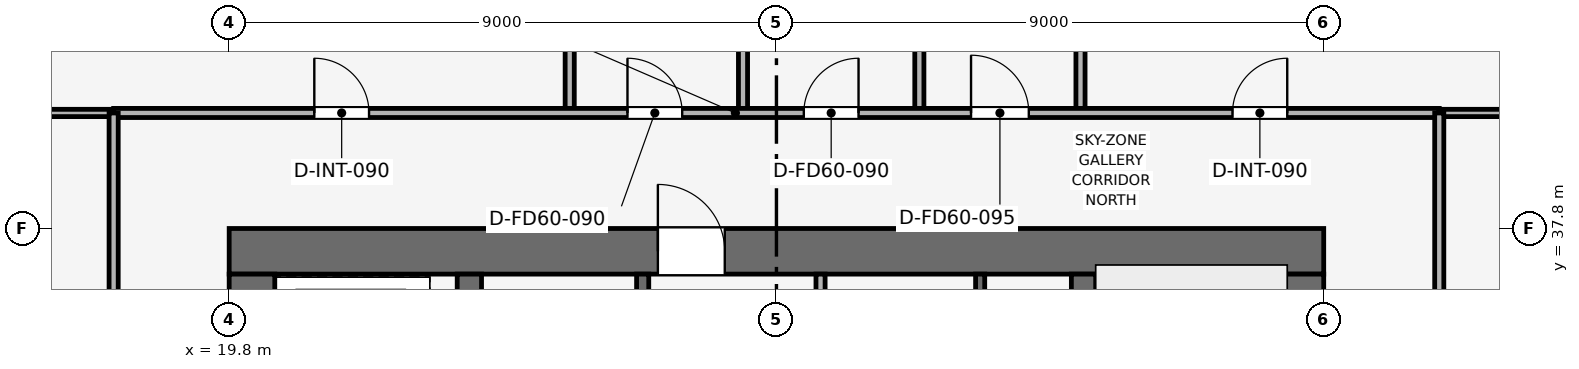
"""IFC4 building model, lengths in metres.
Left out: names, types, materials, properties, quantities, classifications, styles, units other than length and angle.
Written with IfcOpenShell. Run it as: python <this file> out.ifc"""

import sys

from ifc_helpers import new_model, si_unit, direction, frame, frame_2d, origin, place, context, subcontext, project, spatial, rectangle, extrude, element, fill, save


model = new_model("IFC4")
c1 = context("Model", 3, precision=1e-05, world=origin(), true_north=direction((0.0, 1.0)))
c2 = subcontext(c1, "Body", "Model", "MODEL_VIEW")
j1 = project(units=[si_unit("LENGTHUNIT", "METRE"), si_unit("PLANEANGLEUNIT", "RADIAN")], contexts=[c1])
p1 = place(None, origin())
s1 = spatial("IfcSite", under=j1, at=p1, CompositionType="ELEMENT")
p2 = place(p1, origin())
s2 = spatial("IfcBuilding", under=s1, at=p2, CompositionType="ELEMENT")
p3 = place(p2, frame((0.0, 0.0, 272.85)))
s3 = spatial("IfcBuildingStorey", under=s2, at=p3, CompositionType="ELEMENT", Elevation=272.85)
p4 = place(p3, frame((19.8, 37.425, 0.0), z_axis=(0.0, 0.0, 1.0), x_axis=(1.0, 0.0, 0.0)))
e1 = element("IfcWall", 1, at=p4, inside=s3, PredefinedType="SHEAR", context=c2, shape_type="SweptSolid", body=[
    extrude(rectangle(XDim=18.0, YDim=0.75, at=frame_2d((9.0, 0.0))), origin(), (0.0, 0.0, 1.0), 3.75),
])
p5 = place(p4, frame((7.05, 0.0, 0.0)))
e2 = element("IfcOpeningElement", 2, at=p5, cuts=e1, PredefinedType="OPENING", context=c2, shape_type="SweptSolid", body=[
    extrude(rectangle(XDim=1.1, YDim=2.15, at=frame_2d((0.55, 1.075))), frame((0.0, 0.385, 0.0), z_axis=(0.0, -1.0, 0.0), x_axis=(1.0, 0.0, 0.0)), (0.0, 0.0, 1.0), 0.77),
])
p6 = place(p3, frame((20.175, 20.55, 0.0), z_axis=(0.0, 0.0, 1.0), x_axis=(0.0, 1.0, 0.0)))
e3 = element("IfcWall", 3, at=p6, inside=s3, PredefinedType="SHEAR", context=c2, shape_type="SweptSolid", body=[
    extrude(rectangle(XDim=16.5, YDim=0.75, at=frame_2d((8.25, 0.0))), origin(), (0.0, 0.0, 1.0), 3.75),
])
p7 = place(p6, frame((10.25, 0.0, 0.0)))
e4 = element("IfcOpeningElement", 4, at=p7, cuts=e3, PredefinedType="OPENING", context=c2, shape_type="SweptSolid", body=[
    extrude(rectangle(XDim=1.1, YDim=2.15, at=frame_2d((0.55, 1.075))), frame((0.0, 0.385, 0.0), z_axis=(0.0, -1.0, 0.0), x_axis=(1.0, 0.0, 0.0)), (0.0, 0.0, 1.0), 0.77),
])
p8 = place(p3, frame((37.425, 20.55, 0.0), z_axis=(0.0, 0.0, 1.0), x_axis=(0.0, 1.0, 0.0)))
e5 = element("IfcWall", 5, at=p8, inside=s3, PredefinedType="SHEAR", context=c2, shape_type="SweptSolid", body=[
    extrude(rectangle(XDim=16.5, YDim=0.75, at=frame_2d((8.25, 0.0))), origin(), (0.0, 0.0, 1.0), 3.75),
])
p9 = place(p8, frame((4.75, 0.0, 0.0)))
e6 = element("IfcOpeningElement", 6, at=p9, cuts=e5, PredefinedType="OPENING", context=c2, shape_type="SweptSolid", body=[
    extrude(rectangle(XDim=1.1, YDim=2.15, at=frame_2d((0.55, 1.075))), frame((0.0, 0.385, 0.0), z_axis=(0.0, -1.0, 0.0), x_axis=(1.0, 0.0, 0.0)), (0.0, 0.0, 1.0), 0.77),
])
for number, where, z_axis, x_axis in (
    (7, (23.75, 20.55, 0.0), (0.0, 0.0, 1.0), (0.0, 1.0, 0.0)),
    (8, (33.85, 20.55, 0.0), (0.0, 0.0, 1.0), (0.0, 1.0, 0.0)),
):
    element("IfcWall", number, at=place(p3, frame(where, z_axis=z_axis, x_axis=x_axis)), inside=s3, PredefinedType="SHEAR", context=c2, shape_type="SweptSolid", body=[
        extrude(rectangle(XDim=16.5, YDim=0.4, at=frame_2d((8.25, 0.0))), origin(), (0.0, 0.0, 1.0), 3.75),
    ])
p10 = place(p3, frame((32.15, 34.0, 0.0), z_axis=(0.0, 0.0, 1.0), x_axis=(0.0, 1.0, 0.0)))
e9 = element("IfcWall", 9, at=p10, inside=s3, PredefinedType="SHEAR", context=c2, shape_type="SweptSolid", body=[
    extrude(rectangle(XDim=3.05, YDim=0.15, at=frame_2d((1.525, 0.0))), origin(), (0.0, 0.0, 1.0), 3.5),
])
p11 = place(p3, frame((26.6, 34.0, 0.0), z_axis=(0.0, 0.0, 1.0), x_axis=(0.0, 1.0, 0.0)))
e10 = element("IfcWall", 10, at=p11, inside=s3, PredefinedType="SHEAR", context=c2, shape_type="SweptSolid", body=[
    extrude(rectangle(XDim=3.05, YDim=0.2, at=frame_2d((1.525, 0.0))), origin(), (0.0, 0.0, 1.0), 3.5),
])
p12 = place(p11, frame((0.75, 0.0, 0.0)))
e11 = element("IfcOpeningElement", 11, at=p12, cuts=e10, PredefinedType="OPENING", context=c2, shape_type="SweptSolid", body=[
    extrude(rectangle(XDim=1.1, YDim=2.15, at=frame_2d((0.55, 1.075))), frame((0.0, 0.11, 0.0), z_axis=(0.0, -1.0, 0.0), x_axis=(1.0, 0.0, 0.0)), (0.0, 0.0, 1.0), 0.22),
])
p13 = place(p3, frame((29.525, 33.925, 0.0), z_axis=(0.0, 0.0, 1.0), x_axis=(0.0, 1.0, 0.0)))
e12 = element("IfcWall", 12, at=p13, inside=s3, PredefinedType="PARTITIONING", context=c2, shape_type="SweptSolid", body=[
    extrude(rectangle(XDim=3.125, YDim=0.15, at=frame_2d((1.562, 0.0))), origin(), (0.0, 0.0, 1.0), 3.5),
])
p14 = place(p13, frame((0.85, 0.0, 0.0)))
e13 = element("IfcOpeningElement", 13, at=p14, cuts=e12, PredefinedType="OPENING", context=c2, shape_type="SweptSolid", body=[
    extrude(rectangle(XDim=0.9, YDim=2.1, at=frame_2d((0.45, 1.05))), frame((0.0, 0.085, 0.0), z_axis=(0.0, -1.0, 0.0), x_axis=(1.0, 0.0, 0.0)), (0.0, 0.0, 1.0), 0.17),
])
p15 = place(p3, frame((25.4, 39.7, 0.0), z_axis=(0.0, 0.0, 1.0), x_axis=(0.0, 1.0, 0.0)))
e14 = element("IfcWall", 14, at=p15, inside=s3, PredefinedType="PARTITIONING", context=c2, shape_type="SweptSolid", body=[
    extrude(rectangle(XDim=13.87, YDim=0.15, at=frame_2d((6.935, 0.0))), origin(), (0.0, 0.0, 1.0), 3.085),
])
p16 = place(p15, frame((8.035, 0.0, 0.0)))
e15 = element("IfcOpeningElement", 15, at=p16, cuts=e14, PredefinedType="OPENING", context=c2, shape_type="SweptSolid", body=[
    extrude(rectangle(XDim=0.9, YDim=2.1, at=frame_2d((0.45, 1.05))), frame((0.0, 0.085, 0.0), z_axis=(0.0, -1.0, 0.0), x_axis=(1.0, 0.0, 0.0)), (0.0, 0.0, 1.0), 0.17),
])
p17 = place(p3, frame((33.8, 39.7, 0.0), z_axis=(0.0, 0.0, 1.0), x_axis=(0.0, 1.0, 0.0)))
e16 = element("IfcWall", 16, at=p17, inside=s3, PredefinedType="PARTITIONING", context=c2, shape_type="SweptSolid", body=[
    extrude(rectangle(XDim=13.87, YDim=0.15, at=frame_2d((6.935, 0.0))), origin(), (0.0, 0.0, 1.0), 3.085),
])
for number, where, z_axis, x_axis in (
    (17, (28.25, 39.7, 0.0), (0.0, 0.0, 1.0), (0.0, 1.0, 0.0)),
    (18, (31.15, 39.7, 0.0), (0.0, 0.0, 1.0), (0.0, 1.0, 0.0)),
):
    element("IfcWall", number, at=place(p3, frame(where, z_axis=z_axis, x_axis=x_axis)), inside=s3, PredefinedType="PARTITIONING", context=c2, shape_type="SweptSolid", body=[
        extrude(rectangle(XDim=3.1, YDim=0.15, at=frame_2d((1.55, 0.0))), origin(), (0.0, 0.0, 1.0), 3.5),
    ])
p18 = place(p3, frame((4.03, 39.7, 0.0), z_axis=(0.0, 0.0, 1.0), x_axis=(1.0, 0.0, 0.0)))
e19 = element("IfcWall", 19, at=p18, inside=s3, PredefinedType="PARTITIONING", context=c2, shape_type="SweptSolid", body=[
    extrude(rectangle(XDim=13.87, YDim=0.12, at=frame_2d((6.935, 0.0))), origin(), (0.0, 0.0, 1.0), 3.085),
])
p19 = place(p3, frame((39.7, 39.7, 0.0), z_axis=(0.0, 0.0, 1.0), x_axis=(1.0, 0.0, 0.0)))
e20 = element("IfcWall", 20, at=p19, inside=s3, PredefinedType="PARTITIONING", context=c2, shape_type="SweptSolid", body=[
    extrude(rectangle(XDim=13.87, YDim=0.12, at=frame_2d((6.935, 0.0))), origin(), (0.0, 0.0, 1.0), 3.085),
])
p20 = place(p3, frame((17.9, 39.7, 0.0), z_axis=(0.0, 0.0, 1.0), x_axis=(1.0, 0.0, 0.0)))
e21 = element("IfcWall", 21, at=p20, inside=s3, PredefinedType="PARTITIONING", context=c2, shape_type="SweptSolid", body=[
    extrude(rectangle(XDim=21.8, YDim=0.15, at=frame_2d((10.9, 0.0))), origin(), (0.0, 0.0, 1.0), 3.085),
])
p21 = place(p20, frame((3.3, 0.0, 0.0)))
e22 = element("IfcOpeningElement", 22, at=p21, cuts=e21, PredefinedType="OPENING", context=c2, shape_type="SweptSolid", body=[
    extrude(rectangle(XDim=0.9, YDim=2.1, at=frame_2d((0.45, 1.05))), frame((0.0, 0.085, 0.0), z_axis=(0.0, -1.0, 0.0), x_axis=(1.0, 0.0, 0.0)), (0.0, 0.0, 1.0), 0.17),
])
p22 = place(p20, frame((8.45, 0.0, 0.0)))
e23 = element("IfcOpeningElement", 23, at=p22, cuts=e21, PredefinedType="OPENING", context=c2, shape_type="SweptSolid", body=[
    extrude(rectangle(XDim=0.9, YDim=2.1, at=frame_2d((0.45, 1.05))), frame((0.0, 0.085, 0.0), z_axis=(0.0, -1.0, 0.0), x_axis=(1.0, 0.0, 0.0)), (0.0, 0.0, 1.0), 0.17),
])
p23 = place(p20, frame((11.35, 0.0, 0.0)))
e24 = element("IfcOpeningElement", 24, at=p23, cuts=e21, PredefinedType="OPENING", context=c2, shape_type="SweptSolid", body=[
    extrude(rectangle(XDim=0.9, YDim=2.1, at=frame_2d((0.45, 1.05))), frame((0.0, 0.085, 0.0), z_axis=(0.0, -1.0, 0.0), x_axis=(1.0, 0.0, 0.0)), (0.0, 0.0, 1.0), 0.17),
])
p24 = place(p20, frame((14.1, 0.0, 0.0)))
e25 = element("IfcOpeningElement", 25, at=p24, cuts=e21, PredefinedType="OPENING", context=c2, shape_type="SweptSolid", body=[
    extrude(rectangle(XDim=0.95, YDim=2.1, at=frame_2d((0.475, 1.05))), frame((0.0, 0.085, 0.0), z_axis=(0.0, -1.0, 0.0), x_axis=(1.0, 0.0, 0.0)), (0.0, 0.0, 1.0), 0.17),
])
p25 = place(p20, frame((18.4, 0.0, 0.0)))
e26 = element("IfcOpeningElement", 26, at=p25, cuts=e21, PredefinedType="OPENING", context=c2, shape_type="SweptSolid", body=[
    extrude(rectangle(XDim=0.9, YDim=2.1, at=frame_2d((0.45, 1.05))), frame((0.0, 0.085, 0.0), z_axis=(0.0, -1.0, 0.0), x_axis=(1.0, 0.0, 0.0)), (0.0, 0.0, 1.0), 0.17),
])
p26 = place(p3, frame((17.9, 10.8, 0.0), z_axis=(0.0, 0.0, 1.0), x_axis=(0.0, 1.0, 0.0)))
e27 = element("IfcWall", 27, at=p26, inside=s3, PredefinedType="PARTITIONING", context=c2, shape_type="SweptSolid", body=[
    extrude(rectangle(XDim=28.9, YDim=0.15, at=frame_2d((14.45, 0.0))), origin(), (0.0, 0.0, 1.0), 3.085),
])
p27 = place(p26, frame((0.7, 0.0, 0.0)))
e28 = element("IfcOpeningElement", 28, at=p27, cuts=e27, PredefinedType="OPENING", context=c2, shape_type="SweptSolid", body=[
    extrude(rectangle(XDim=0.9, YDim=2.1, at=frame_2d((0.45, 1.05))), frame((0.0, 0.085, 0.0), z_axis=(0.0, -1.0, 0.0), x_axis=(1.0, 0.0, 0.0)), (0.0, 0.0, 1.0), 0.17),
])
p28 = place(p26, frame((5.952, 0.0, 0.0)))
e29 = element("IfcOpeningElement", 29, at=p28, cuts=e27, PredefinedType="OPENING", context=c2, shape_type="SweptSolid", body=[
    extrude(rectangle(XDim=0.9, YDim=2.1, at=frame_2d((0.45, 1.05))), frame((0.0, 0.085, 0.0), z_axis=(0.0, -1.0, 0.0), x_axis=(1.0, 0.0, 0.0)), (0.0, 0.0, 1.0), 0.17),
])
p29 = place(p26, frame((14.02, 0.0, 0.0)))
e30 = element("IfcOpeningElement", 30, at=p29, cuts=e27, PredefinedType="OPENING", context=c2, shape_type="SweptSolid", body=[
    extrude(rectangle(XDim=0.9, YDim=2.1, at=frame_2d((0.45, 1.05))), frame((0.0, 0.085, 0.0), z_axis=(0.0, -1.0, 0.0), x_axis=(1.0, 0.0, 0.0)), (0.0, 0.0, 1.0), 0.17),
])
p30 = place(p26, frame((23.217, 0.0, 0.0)))
e31 = element("IfcOpeningElement", 31, at=p30, cuts=e27, PredefinedType="OPENING", context=c2, shape_type="SweptSolid", body=[
    extrude(rectangle(XDim=0.9, YDim=2.1, at=frame_2d((0.45, 1.05))), frame((0.0, 0.085, 0.0), z_axis=(0.0, -1.0, 0.0), x_axis=(1.0, 0.0, 0.0)), (0.0, 0.0, 1.0), 0.17),
])
p31 = place(p3, frame((39.7, 24.4, 0.0), z_axis=(0.0, 0.0, 1.0), x_axis=(0.0, 1.0, 0.0)))
e32 = element("IfcWall", 32, at=p31, inside=s3, PredefinedType="PARTITIONING", context=c2, shape_type="SweptSolid", body=[
    extrude(rectangle(XDim=15.3, YDim=0.15, at=frame_2d((7.65, 0.0))), origin(), (0.0, 0.0, 1.0), 3.085),
])
p32 = place(p31, frame((3.032, 0.0, 0.0)))
e33 = element("IfcOpeningElement", 33, at=p32, cuts=e32, PredefinedType="OPENING", context=c2, shape_type="SweptSolid", body=[
    extrude(rectangle(XDim=0.9, YDim=2.1, at=frame_2d((0.45, 1.05))), frame((0.0, 0.085, 0.0), z_axis=(0.0, -1.0, 0.0), x_axis=(1.0, 0.0, 0.0)), (0.0, 0.0, 1.0), 0.17),
])
p33 = place(p31, frame((10.682, 0.0, 0.0)))
e34 = element("IfcOpeningElement", 34, at=p33, cuts=e32, PredefinedType="OPENING", context=c2, shape_type="SweptSolid", body=[
    extrude(rectangle(XDim=0.9, YDim=2.1, at=frame_2d((0.45, 1.05))), frame((0.0, 0.085, 0.0), z_axis=(0.0, -1.0, 0.0), x_axis=(1.0, 0.0, 0.0)), (0.0, 0.0, 1.0), 0.17),
])
p34 = place(p21, origin())
e35 = element("IfcDoor", 35, at=p34, inside=s3, OperationType="SINGLE_SWING_LEFT", PredefinedType="DOOR", context=c2, shape_type="SweptSolid", body=[
    extrude(rectangle(XDim=0.9, YDim=2.1, at=frame_2d((0.45, 1.05))), frame((0.0, 0.025, 0.0), z_axis=(0.0, -1.0, 0.0), x_axis=(1.0, 0.0, 0.0)), (0.0, 0.0, 1.0), 0.05),
])
fill(e22, e35)
p35 = place(p22, origin())
e36 = element("IfcDoor", 36, at=p35, inside=s3, OperationType="SINGLE_SWING_LEFT", PredefinedType="DOOR", context=c2, shape_type="SweptSolid", body=[
    extrude(rectangle(XDim=0.9, YDim=2.1, at=frame_2d((0.45, 1.05))), frame((0.0, 0.025, 0.0), z_axis=(0.0, -1.0, 0.0), x_axis=(1.0, 0.0, 0.0)), (0.0, 0.0, 1.0), 0.05),
])
fill(e23, e36)
p36 = place(p23, origin())
e37 = element("IfcDoor", 37, at=p36, inside=s3, OperationType="SINGLE_SWING_RIGHT", PredefinedType="DOOR", context=c2, shape_type="SweptSolid", body=[
    extrude(rectangle(XDim=0.9, YDim=2.1, at=frame_2d((0.45, 1.05))), frame((0.0, 0.025, 0.0), z_axis=(0.0, -1.0, 0.0), x_axis=(1.0, 0.0, 0.0)), (0.0, 0.0, 1.0), 0.05),
])
fill(e24, e37)
p37 = place(p24, origin())
e38 = element("IfcDoor", 38, at=p37, inside=s3, OperationType="SINGLE_SWING_LEFT", PredefinedType="DOOR", context=c2, shape_type="SweptSolid", body=[
    extrude(rectangle(XDim=0.95, YDim=2.1, at=frame_2d((0.475, 1.05))), frame((0.0, 0.025, 0.0), z_axis=(0.0, -1.0, 0.0), x_axis=(1.0, 0.0, 0.0)), (0.0, 0.0, 1.0), 0.05),
])
fill(e25, e38)
p38 = place(p25, origin())
e39 = element("IfcDoor", 39, at=p38, inside=s3, OperationType="SINGLE_SWING_RIGHT", PredefinedType="DOOR", context=c2, shape_type="SweptSolid", body=[
    extrude(rectangle(XDim=0.9, YDim=2.1, at=frame_2d((0.45, 1.05))), frame((0.0, 0.025, 0.0), z_axis=(0.0, -1.0, 0.0), x_axis=(1.0, 0.0, 0.0)), (0.0, 0.0, 1.0), 0.05),
])
fill(e26, e39)
p39 = place(p5, origin())
e40 = element("IfcDoor", 40, at=p39, inside=s3, OperationType="SINGLE_SWING_LEFT", PredefinedType="DOOR", context=c2, shape_type="SweptSolid", body=[
    extrude(rectangle(XDim=1.1, YDim=2.15, at=frame_2d((0.55, 1.075))), frame((0.0, 0.025, 0.0), z_axis=(0.0, -1.0, 0.0), x_axis=(1.0, 0.0, 0.0)), (0.0, 0.0, 1.0), 0.05),
])
fill(e2, e40)
save(model, sys.argv[1])
